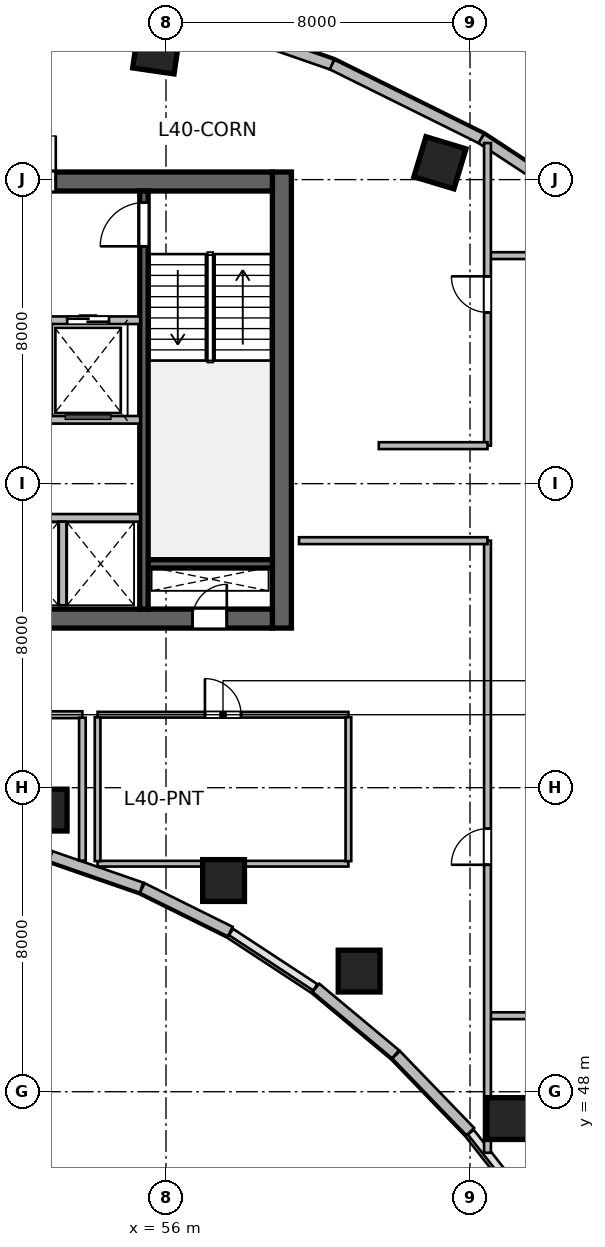
"""IFC4 building model, lengths in metres.
Left out: names, types, materials, properties, quantities, classifications, styles, units other than length and angle.
Written with IfcOpenShell. Run it as: python <this file> out.ifc"""

import sys

from ifc_helpers import new_model, si_unit, direction, frame, frame_2d, origin, origin_2d, place, context, subcontext, project, spatial, rectangle, circle, extrude, source, transform, mapped, element, fill, save


model = new_model("IFC4")
c1 = context("Model", 3, precision=1e-05, world=origin(), true_north=direction((0.0, 1.0)))
c2 = subcontext(c1, "Body", "Model", "MODEL_VIEW")
j1 = project(units=[si_unit("LENGTHUNIT", "METRE"), si_unit("PLANEANGLEUNIT", "RADIAN")], contexts=[c1])
p1 = place(None, origin())
s1 = spatial("IfcSite", under=j1, at=p1, CompositionType="ELEMENT")
p2 = place(p1, origin())
s2 = spatial("IfcBuilding", under=s1, at=p2, CompositionType="ELEMENT")
p3 = place(p2, frame((0.0, 0.0, 166.2)))
s3 = spatial("IfcBuildingStorey", under=s2, at=p3, CompositionType="ELEMENT", Elevation=166.2)
m1 = source(origin(), c2, "Body", "SweptSolid", [
    extrude(rectangle(XDim=12.0, YDim=0.5, at=frame_2d((6.0, 0.0))), origin(), (0.0, 0.0, 1.0), 3.9),
])
p4 = place(p3, frame((59.05, 60.2, 0.0), z_axis=(0.0, 0.0, 1.0), x_axis=(0.0, 1.0, 0.0)))
e1 = element("IfcWall", 1, at=p4, inside=s3, PredefinedType="SHEAR", context=c2, shape_type="MappedRepresentation", body=[
    mapped(m1, transform((0.0, 0.0, 0.0), scale=1.0)),
])
m2 = source(origin(), c2, "Body", "SweptSolid", [
    extrude(rectangle(XDim=21.6, YDim=0.5, at=frame_2d((10.8, 0.0))), origin(), (0.0, 0.0, 1.0), 3.9),
])
p5 = place(p3, frame((37.2, 60.45, 0.0), z_axis=(0.0, 0.0, 1.0), x_axis=(1.0, 0.0, 0.0)))
e2 = element("IfcWall", 2, at=p5, inside=s3, PredefinedType="SHEAR", context=c2, shape_type="MappedRepresentation", body=[
    mapped(m2, transform((0.0, 0.0, 0.0), scale=1.0)),
])
p6 = place(p5, frame((1.1, 0.0, 0.0)))
e3 = element("IfcOpeningElement", 3, at=p6, cuts=e2, PredefinedType="OPENING", context=c2, shape_type="SweptSolid", body=[
    extrude(rectangle(XDim=1.15, YDim=2.15, at=frame_2d((0.575, 1.075))), frame((0.0, 0.26, 0.0), z_axis=(0.0, -1.0, 0.0), x_axis=(1.0, 0.0, 0.0)), (0.0, 0.0, 1.0), 0.52),
])
p7 = place(p5, frame((19.5, 0.0, 0.0)))
e4 = element("IfcOpeningElement", 4, at=p7, cuts=e2, PredefinedType="OPENING", context=c2, shape_type="SweptSolid", body=[
    extrude(rectangle(XDim=0.9, YDim=2.1, at=frame_2d((0.45, 1.05))), frame((0.0, 0.26, 0.0), z_axis=(0.0, -1.0, 0.0), x_axis=(1.0, 0.0, 0.0)), (0.0, 0.0, 1.0), 0.52),
])
p8 = place(p5, frame((12.02, 0.0, 0.0)))
e5 = element("IfcOpeningElement", 5, at=p8, cuts=e2, PredefinedType="OPENING", context=c2, shape_type="SweptSolid", body=[
    extrude(rectangle(XDim=1.6, YDim=2.15, at=frame_2d((0.8, 1.075))), frame((0.0, 0.26, 0.0), z_axis=(0.0, -1.0, 0.0), x_axis=(1.0, 0.0, 0.0)), (0.0, 0.0, 1.0), 0.52),
])
p9 = place(p3, frame((37.2, 71.95, 0.0), z_axis=(0.0, 0.0, 1.0), x_axis=(1.0, 0.0, 0.0)))
e6 = element("IfcWall", 6, at=p9, inside=s3, PredefinedType="SHEAR", context=c2, shape_type="MappedRepresentation", body=[
    mapped(m2, transform((0.0, 0.0, 0.0), scale=1.0)),
])
p10 = place(p9, frame((1.2, 0.0, 0.0)))
e7 = element("IfcOpeningElement", 7, at=p10, cuts=e6, PredefinedType="OPENING", context=c2, shape_type="SweptSolid", body=[
    extrude(rectangle(XDim=0.9, YDim=2.1, at=frame_2d((0.45, 1.05))), frame((0.0, 0.26, 0.0), z_axis=(0.0, -1.0, 0.0), x_axis=(1.0, 0.0, 0.0)), (0.0, 0.0, 1.0), 0.52),
])
p11 = place(p9, frame((14.7, 0.0, 0.0)))
e8 = element("IfcOpeningElement", 8, at=p11, cuts=e6, PredefinedType="OPENING", context=c2, shape_type="SweptSolid", body=[
    extrude(rectangle(XDim=1.2, YDim=2.15, at=frame_2d((0.6, 1.075))), frame((0.0, 0.26, 0.0), z_axis=(0.0, -1.0, 0.0), x_axis=(1.0, 0.0, 0.0)), (0.0, 0.0, 1.0), 0.52),
])
p12 = place(p9, frame((4.15, 0.0, 0.0)))
e9 = element("IfcOpeningElement", 9, at=p12, cuts=e6, PredefinedType="OPENING", context=c2, shape_type="SweptSolid", body=[
    extrude(rectangle(XDim=1.3, YDim=2.15, at=frame_2d((0.65, 1.075))), frame((0.0, 0.26, 0.0), z_axis=(0.0, -1.0, 0.0), x_axis=(1.0, 0.0, 0.0)), (0.0, 0.0, 1.0), 0.52),
])
p13 = place(p9, frame((7.25, 0.0, 0.0)))
e10 = element("IfcOpeningElement", 10, at=p13, cuts=e6, PredefinedType="OPENING", context=c2, shape_type="SweptSolid", body=[
    extrude(rectangle(XDim=0.9, YDim=2.1, at=frame_2d((0.45, 1.05))), frame((0.0, 0.26, 0.0), z_axis=(0.0, -1.0, 0.0), x_axis=(1.0, 0.0, 0.0)), (0.0, 0.0, 1.0), 0.52),
])
p14 = place(p9, frame((10.95, 0.0, 0.0)))
e11 = element("IfcOpeningElement", 11, at=p14, cuts=e6, PredefinedType="OPENING", context=c2, shape_type="SweptSolid", body=[
    extrude(rectangle(XDim=0.9, YDim=2.1, at=frame_2d((0.45, 1.05))), frame((0.0, 0.26, 0.0), z_axis=(0.0, -1.0, 0.0), x_axis=(1.0, 0.0, 0.0)), (0.0, 0.0, 1.0), 0.52),
])
m3 = source(origin(), c2, "Body", "SweptSolid", [
    extrude(rectangle(XDim=3.27, YDim=0.22, at=frame_2d((1.635, 0.0))), origin(), (0.0, 0.0, 1.0), 3.9),
])
p15 = place(p3, frame((55.53, 61.89, 0.0), z_axis=(0.0, 0.0, 1.0), x_axis=(1.0, 0.0, 0.0)))
e12 = element("IfcWall", 12, at=p15, inside=s3, PredefinedType="SHEAR", context=c2, shape_type="MappedRepresentation", body=[
    mapped(m3, transform((0.0, 0.0, 0.0), scale=1.0)),
])
m4 = source(origin(), c2, "Body", "SweptSolid", [
    extrude(rectangle(XDim=11.0, YDim=0.22, at=frame_2d((5.5, 0.0))), origin(), (0.0, 0.0, 1.0), 3.9),
])
p16 = place(p3, frame((55.42, 60.7, 0.0), z_axis=(0.0, 0.0, 1.0), x_axis=(0.0, 1.0, 0.0)))
e13 = element("IfcWall", 13, at=p16, inside=s3, PredefinedType="SHEAR", context=c2, shape_type="MappedRepresentation", body=[
    mapped(m4, transform((0.0, 0.0, 0.0), scale=1.0)),
])
p17 = place(p16, frame((9.545, 0.0, 0.0)))
e14 = element("IfcOpeningElement", 14, at=p17, cuts=e13, PredefinedType="OPENING", context=c2, shape_type="SweptSolid", body=[
    extrude(rectangle(XDim=1.15, YDim=2.15, at=frame_2d((0.575, 1.075))), frame((0.0, 0.12, 0.0), z_axis=(0.0, -1.0, 0.0), x_axis=(1.0, 0.0, 0.0)), (0.0, 0.0, 1.0), 0.24),
])
m5 = source(origin(), c2, "Body", "SweptSolid", [
    extrude(circle(Radius=0.55, at=origin_2d()), origin(), (0.0, 0.0, 1.0), 3.9),
])
p18 = place(p3, frame((52.846, 55.411, 0.0), z_axis=(0.0, 0.0, 1.0), x_axis=(0.143492621991, 0.98965138682, 0.0)))
e15 = element("IfcColumn", 15, at=p18, inside=s3, PredefinedType="COLUMN", context=c2, shape_type="MappedRepresentation", body=[
    mapped(m5, transform((0.0, 0.0, 0.0), scale=1.0)),
])
m6 = source(origin(), c2, "Body", "SweptSolid", [
    extrude(rectangle(XDim=1.1, YDim=1.1, at=origin_2d()), origin(), (0.0, 0.0, 1.0), 3.9),
])
p19 = place(p3, frame((55.747, 75.404, 0.0), z_axis=(0.0, 0.0, 1.0), x_axis=(0.143492621991, 0.98965138682, 0.0)))
e16 = element("IfcColumn", 16, at=p19, inside=s3, PredefinedType="COLUMN", context=c2, shape_type="MappedRepresentation", body=[
    mapped(m6, transform((0.0, 0.0, 0.0), scale=1.0)),
])
p20 = place(p3, frame((57.515, 53.558, 0.0), z_axis=(0.0, 0.0, 1.0), x_axis=(0.288697611798, 0.957420330337, 0.0)))
e17 = element("IfcColumn", 17, at=p20, inside=s3, PredefinedType="COLUMN", context=c2, shape_type="MappedRepresentation", body=[
    mapped(m5, transform((0.0, 0.0, 0.0), scale=1.0)),
])
p21 = place(p3, frame((63.209, 72.442, 0.0), z_axis=(0.0, 0.0, 1.0), x_axis=(0.288697611798, 0.957420330337, 0.0)))
e18 = element("IfcColumn", 18, at=p21, inside=s3, PredefinedType="COLUMN", context=c2, shape_type="MappedRepresentation", body=[
    mapped(m6, transform((0.0, 0.0, 0.0), scale=1.0)),
])
for number, where, z_axis, x_axis in (
    (19, (61.082, 51.175, 0.0), (0.0, 0.0, 1.0), (0.409, 0.912, 0.0)),
    (20, (64.996, 47.294, 0.0), (0.0, 0.0, 1.0), (0.558, 0.83, 0.0)),
):
    element("IfcColumn", number, at=place(p3, frame(where, z_axis=z_axis, x_axis=x_axis)), inside=s3, PredefinedType="COLUMN", context=c2, shape_type="MappedRepresentation", body=[
        mapped(m5, transform((0.0, 0.0, 0.0), scale=1.0)),
    ])
m7 = source(origin(), c2, "Body", "SweptSolid", [
    extrude(rectangle(XDim=2.812, YDim=0.28, at=frame_2d((1.406, 0.0))), origin(), (0.0, 0.0, 1.0), 3.65),
])
p22 = place(p3, frame((64.008, 46.95, 0.0), z_axis=(0.0, 0.0, 1.0), x_axis=(-0.694583668785, 0.719411931411, 0.0)))
e21 = element("IfcWall", 21, at=p22, inside=s3, PredefinedType="SOLIDWALL", context=c2, shape_type="MappedRepresentation", body=[
    mapped(m7, transform((0.0, 0.0, 0.0), scale=1.0)),
])
m8 = source(origin(), c2, "Body", "SweptSolid", [
    extrude(rectangle(XDim=2.729, YDim=0.28, at=frame_2d((1.365, 0.0))), origin(), (0.0, 0.0, 1.0), 3.65),
])
p23 = place(p3, frame((62.041, 48.987, 0.0), z_axis=(0.0, 0.0, 1.0), x_axis=(-0.767957284255, 0.640501061326, 0.0)))
e22 = element("IfcWall", 22, at=p23, inside=s3, PredefinedType="SOLIDWALL", context=c2, shape_type="MappedRepresentation", body=[
    mapped(m8, transform((0.0, 0.0, 0.0), scale=1.0)),
])
m9 = source(origin(), c2, "Body", "SweptSolid", [
    extrude(rectangle(XDim=2.584, YDim=0.28, at=frame_2d((1.292, 0.0))), origin(), (0.0, 0.0, 1.0), 3.65),
])
p24 = place(p3, frame((57.692, 52.213, 0.0), z_axis=(0.0, 0.0, 1.0), x_axis=(-0.895989792847, 0.44407464588, 0.0)))
e23 = element("IfcWall", 23, at=p24, inside=s3, PredefinedType="SOLIDWALL", context=c2, shape_type="MappedRepresentation", body=[
    mapped(m9, transform((0.0, 0.0, 0.0), scale=1.0)),
])
m10 = source(origin(), c2, "Body", "SweptSolid", [
    extrude(rectangle(XDim=2.53, YDim=0.28, at=frame_2d((1.265, 0.0))), origin(), (0.0, 0.0, 1.0), 3.65),
])
p25 = place(p3, frame((55.355, 53.37, 0.0), z_axis=(0.0, 0.0, 1.0), x_axis=(-0.944872429646, 0.327438683872, 0.0)))
e24 = element("IfcWall", 24, at=p25, inside=s3, PredefinedType="SOLIDWALL", context=c2, shape_type="MappedRepresentation", body=[
    mapped(m10, transform((0.0, 0.0, 0.0), scale=1.0)),
])
m11 = source(origin(), c2, "Body", "SweptSolid", [
    extrude(rectangle(XDim=4.29, YDim=0.28, at=frame_2d((2.145, 0.0))), origin(), (0.0, 0.0, 1.0), 3.65),
])
p26 = place(p3, frame((56.317, 76.431, 0.0), z_axis=(0.0, 0.0, 1.0), x_axis=(0.944883859218, -0.3274057003, 0.0)))
e25 = element("IfcWall", 25, at=p26, inside=s3, PredefinedType="SOLIDWALL", context=c2, shape_type="MappedRepresentation", body=[
    mapped(m11, transform((0.0, 0.0, 0.0), scale=1.0)),
])
m12 = source(origin(), c2, "Body", "SweptSolid", [
    extrude(rectangle(XDim=4.384, YDim=0.28, at=frame_2d((2.192, 0.0))), origin(), (0.0, 0.0, 1.0), 3.65),
])
p27 = place(p3, frame((60.37, 75.027, 0.0), z_axis=(0.0, 0.0, 1.0), x_axis=(0.895969968053, -0.444114643248, 0.0)))
e26 = element("IfcWall", 26, at=p27, inside=s3, PredefinedType="SOLIDWALL", context=c2, shape_type="MappedRepresentation", body=[
    mapped(m12, transform((0.0, 0.0, 0.0), scale=1.0)),
])
m13 = source(origin(), c2, "Body", "SweptSolid", [
    extrude(rectangle(XDim=4.501, YDim=0.28, at=frame_2d((2.25, 0.0))), origin(), (0.0, 0.0, 1.0), 3.65),
])
p28 = place(p3, frame((64.298, 73.08, 0.0), z_axis=(0.0, 0.0, 1.0), x_axis=(0.835984920737, -0.548752414391, 0.0)))
e27 = element("IfcWall", 27, at=p28, inside=s3, PredefinedType="SOLIDWALL", context=c2, shape_type="MappedRepresentation", body=[
    mapped(m13, transform((0.0, 0.0, 0.0), scale=1.0)),
])
m14 = source(origin(), c2, "Body", "SweptSolid", [
    extrude(rectangle(XDim=5.62, YDim=0.2, at=frame_2d((2.81, 0.0))), origin(), (0.0, 0.0, 1.0), 3.65),
])
p29 = place(p3, frame((49.7, 68.3, 0.0), z_axis=(0.0, 0.0, 1.0), x_axis=(1.0, 0.0, 0.0)))
e28 = element("IfcWall", 28, at=p29, inside=s3, PredefinedType="SOLIDWALL", context=c2, shape_type="MappedRepresentation", body=[
    mapped(m14, transform((0.0, 0.0, 0.0), scale=1.0)),
])
p30 = place(p29, frame((1.6, 0.0, 0.0)))
e29 = element("IfcOpeningElement", 29, at=p30, cuts=e28, PredefinedType="OPENING", context=c2, shape_type="SweptSolid", body=[
    extrude(rectangle(XDim=1.1, YDim=2.15, at=frame_2d((0.55, 1.075))), frame((0.0, 0.11, 0.0), z_axis=(0.0, -1.0, 0.0), x_axis=(1.0, 0.0, 0.0)), (0.0, 0.0, 1.0), 0.22),
])
p31 = place(p29, frame((3.7, 0.0, 0.0)))
e30 = element("IfcOpeningElement", 30, at=p31, cuts=e28, PredefinedType="OPENING", context=c2, shape_type="SweptSolid", body=[
    extrude(rectangle(XDim=1.1, YDim=2.15, at=frame_2d((0.55, 1.075))), frame((0.0, 0.11, 0.0), z_axis=(0.0, -1.0, 0.0), x_axis=(1.0, 0.0, 0.0)), (0.0, 0.0, 1.0), 0.22),
])
p32 = place(p3, frame((49.7, 65.68, 0.0), z_axis=(0.0, 0.0, 1.0), x_axis=(1.0, 0.0, 0.0)))
e31 = element("IfcWall", 31, at=p32, inside=s3, PredefinedType="SOLIDWALL", context=c2, shape_type="MappedRepresentation", body=[
    mapped(m14, transform((0.0, 0.0, 0.0), scale=1.0)),
])
m15 = source(origin(), c2, "Body", "SweptSolid", [
    extrude(rectangle(XDim=4.1, YDim=0.2, at=frame_2d((2.05, 0.0))), origin(), (0.0, 0.0, 1.0), 3.65),
])
p33 = place(p3, frame((51.22, 63.1, 0.0), z_axis=(0.0, 0.0, 1.0), x_axis=(1.0, 0.0, 0.0)))
e32 = element("IfcWall", 32, at=p33, inside=s3, PredefinedType="SOLIDWALL", context=c2, shape_type="MappedRepresentation", body=[
    mapped(m15, transform((0.0, 0.0, 0.0), scale=1.0)),
])
m16 = source(origin(), c2, "Body", "SweptSolid", [
    extrude(rectangle(XDim=2.2, YDim=0.2, at=frame_2d((1.1, 0.0))), origin(), (0.0, 0.0, 1.0), 3.65),
])
p34 = place(p3, frame((53.28, 60.8, 0.0), z_axis=(0.0, 0.0, 1.0), x_axis=(0.0, 1.0, 0.0)))
e33 = element("IfcWall", 33, at=p34, inside=s3, PredefinedType="SOLIDWALL", context=c2, shape_type="MappedRepresentation", body=[
    mapped(m16, transform((0.0, 0.0, 0.0), scale=1.0)),
])
m17 = source(origin(), c2, "Body", "SweptSolid", [
    extrude(rectangle(XDim=3.248, YDim=0.18, at=frame_2d((1.624, 0.0))), origin(), (0.0, 0.0, 1.0), 3.65),
])
p35 = place(p3, frame((50.552, 57.92, 0.0), z_axis=(0.0, 0.0, 1.0), x_axis=(1.0, 0.0, 0.0)))
e34 = element("IfcWall", 34, at=p35, inside=s3, PredefinedType="PLUMBINGWALL", context=c2, shape_type="MappedRepresentation", body=[
    mapped(m17, transform((0.0, 0.0, 0.0), scale=1.0)),
])
p36 = place(p35, frame((1.149, 0.0, 0.0)))
e35 = element("IfcOpeningElement", 35, at=p36, cuts=e34, PredefinedType="OPENING", context=c2, shape_type="SweptSolid", body=[
    extrude(rectangle(XDim=0.95, YDim=2.12, at=frame_2d((0.475, 1.06))), frame((0.0, 0.1, 0.0), z_axis=(0.0, -1.0, 0.0), x_axis=(1.0, 0.0, 0.0)), (0.0, 0.0, 1.0), 0.2),
])
m18 = source(origin(), c2, "Body", "SweptSolid", [
    extrude(rectangle(XDim=3.763, YDim=0.175, at=frame_2d((1.881, 0.0))), origin(), (0.0, 0.0, 1.0), 3.65),
])
p37 = place(p3, frame((53.8, 54.079, 0.0), z_axis=(0.0, 0.0, 1.0), x_axis=(0.0, 1.0, 0.0)))
e36 = element("IfcWall", 36, at=p37, inside=s3, PredefinedType="PARTITIONING", context=c2, shape_type="MappedRepresentation", body=[
    mapped(m18, transform((0.0, 0.0, 0.0), scale=1.0)),
])
m19 = source(origin(), c2, "Body", "SweptSolid", [
    extrude(rectangle(XDim=6.6, YDim=0.15, at=frame_2d((3.3, 0.0))), origin(), (0.0, 0.0, 1.0), 3.095),
])
p38 = place(p3, frame((54.2, 54.0, 0.0), z_axis=(0.0, 0.0, 1.0), x_axis=(1.0, 0.0, 0.0)))
e37 = element("IfcWall", 37, at=p38, inside=s3, PredefinedType="PARTITIONING", context=c2, shape_type="MappedRepresentation", body=[
    mapped(m19, transform((0.0, 0.0, 0.0), scale=1.0)),
])
m20 = source(origin(), c2, "Body", "SweptSolid", [
    extrude(rectangle(XDim=6.6, YDim=0.15, at=frame_2d((3.3, 0.0))), origin(), (0.0, 0.0, 1.0), 3.65),
])
p39 = place(p3, frame((54.2, 57.92, 0.0), z_axis=(0.0, 0.0, 1.0), x_axis=(1.0, 0.0, 0.0)))
e38 = element("IfcWall", 38, at=p39, inside=s3, PredefinedType="PARTITIONING", context=c2, shape_type="MappedRepresentation", body=[
    mapped(m20, transform((0.0, 0.0, 0.0), scale=1.0)),
])
p40 = place(p39, frame((2.825, 0.0, 0.0)))
e39 = element("IfcOpeningElement", 39, at=p40, cuts=e38, PredefinedType="OPENING", context=c2, shape_type="SweptSolid", body=[
    extrude(rectangle(XDim=0.95, YDim=2.1, at=frame_2d((0.475, 1.05))), frame((0.0, 0.085, 0.0), z_axis=(0.0, -1.0, 0.0), x_axis=(1.0, 0.0, 0.0)), (0.0, 0.0, 1.0), 0.17),
])
m21 = source(origin(), c2, "Body", "SweptSolid", [
    extrude(rectangle(XDim=3.785, YDim=0.15, at=frame_2d((1.893, 0.0))), origin(), (0.0, 0.0, 1.0), 3.65),
])
for number, where, z_axis, x_axis in (
    (40, (54.2, 54.067, 0.0), (0.0, 0.0, 1.0), (0.0, 1.0, 0.0)),
    (41, (60.8, 54.067, 0.0), (0.0, 0.0, 1.0), (0.0, 1.0, 0.0)),
):
    element("IfcWall", number, at=place(p3, frame(where, z_axis=z_axis, x_axis=x_axis)), inside=s3, PredefinedType="PARTITIONING", context=c2, shape_type="MappedRepresentation", body=[
        mapped(m21, transform((0.0, 0.0, 0.0), scale=1.0)),
    ])
m22 = source(origin(), c2, "Body", "SweptSolid", [
    extrude(rectangle(XDim=2.5, YDim=0.18, at=frame_2d((1.25, 0.0))), origin(), (0.0, 0.0, 1.0), 3.65),
])
p41 = place(p3, frame((64.5, 50.0, 0.0), z_axis=(0.0, 0.0, 1.0), x_axis=(1.0, 0.0, 0.0)))
e42 = element("IfcWall", 42, at=p41, inside=s3, PredefinedType="PLUMBINGWALL", context=c2, shape_type="MappedRepresentation", body=[
    mapped(m22, transform((0.0, 0.0, 0.0), scale=1.0)),
])
m23 = source(origin(), c2, "Body", "SweptSolid", [
    extrude(rectangle(XDim=2.5, YDim=0.18, at=frame_2d((1.25, 0.0))), origin(), (0.0, 0.0, 1.0), 3.022),
])
p42 = place(p3, frame((64.5, 70.0, 0.0), z_axis=(0.0, 0.0, 1.0), x_axis=(1.0, 0.0, 0.0)))
e43 = element("IfcWall", 43, at=p42, inside=s3, PredefinedType="PLUMBINGWALL", context=c2, shape_type="MappedRepresentation", body=[
    mapped(m23, transform((0.0, 0.0, 0.0), scale=1.0)),
])
m24 = source(origin(), c2, "Body", "SweptSolid", [
    extrude(rectangle(XDim=16.106, YDim=0.18, at=frame_2d((8.053, 0.0))), origin(), (0.0, 0.0, 1.0), 2.942),
])
p43 = place(p3, frame((64.46, 46.394, 0.0), z_axis=(0.0, 0.0, 1.0), x_axis=(0.0, 1.0, 0.0)))
e44 = element("IfcWall", 44, at=p43, inside=s3, PredefinedType="PLUMBINGWALL", context=c2, shape_type="MappedRepresentation", body=[
    mapped(m24, transform((0.0, 0.0, 0.0), scale=1.0)),
])
p44 = place(p43, frame((7.578, 0.0, 0.0)))
e45 = element("IfcOpeningElement", 45, at=p44, cuts=e44, PredefinedType="OPENING", context=c2, shape_type="SweptSolid", body=[
    extrude(rectangle(XDim=0.95, YDim=2.1, at=frame_2d((0.475, 1.05))), frame((0.0, 0.1, 0.0), z_axis=(0.0, -1.0, 0.0), x_axis=(1.0, 0.0, 0.0)), (0.0, 0.0, 1.0), 0.2),
])
m25 = source(origin(), c2, "Body", "SweptSolid", [
    extrude(rectangle(XDim=4.96, YDim=0.18, at=frame_2d((2.48, 0.0))), origin(), (0.0, 0.0, 1.0), 3.65),
])
p45 = place(p3, frame((59.5, 62.5, 0.0), z_axis=(0.0, 0.0, 1.0), x_axis=(1.0, 0.0, 0.0)))
e46 = element("IfcWall", 46, at=p45, inside=s3, PredefinedType="PLUMBINGWALL", context=c2, shape_type="MappedRepresentation", body=[
    mapped(m25, transform((0.0, 0.0, 0.0), scale=1.0)),
])
m26 = source(origin(), c2, "Body", "SweptSolid", [
    extrude(rectangle(XDim=7.962, YDim=0.18, at=frame_2d((3.981, 0.0))), origin(), (0.0, 0.0, 1.0), 3.65),
])
p46 = place(p3, frame((64.46, 65.0, 0.0), z_axis=(0.0, 0.0, 1.0), x_axis=(0.0, 1.0, 0.0)))
e47 = element("IfcWall", 47, at=p46, inside=s3, PredefinedType="PLUMBINGWALL", context=c2, shape_type="MappedRepresentation", body=[
    mapped(m26, transform((0.0, 0.0, 0.0), scale=1.0)),
])
p47 = place(p46, frame((3.506, 0.0, 0.0)))
e48 = element("IfcOpeningElement", 48, at=p47, cuts=e47, PredefinedType="OPENING", context=c2, shape_type="SweptSolid", body=[
    extrude(rectangle(XDim=0.95, YDim=2.1, at=frame_2d((0.475, 1.05))), frame((0.0, 0.1, 0.0), z_axis=(0.0, -1.0, 0.0), x_axis=(1.0, 0.0, 0.0)), (0.0, 0.0, 1.0), 0.2),
])
m27 = source(origin(), c2, "Body", "SweptSolid", [
    extrude(rectangle(XDim=2.86, YDim=0.18, at=frame_2d((1.43, 0.0))), origin(), (0.0, 0.0, 1.0), 3.65),
])
p48 = place(p3, frame((61.6, 65.0, 0.0), z_axis=(0.0, 0.0, 1.0), x_axis=(1.0, 0.0, 0.0)))
e49 = element("IfcWall", 49, at=p48, inside=s3, PredefinedType="PLUMBINGWALL", context=c2, shape_type="MappedRepresentation", body=[
    mapped(m27, transform((0.0, 0.0, 0.0), scale=1.0)),
])
m28 = source(origin(), c2, "Body", "SweptSolid", [
    extrude(rectangle(XDim=0.9, YDim=2.1, at=frame_2d((0.45, 1.05))), frame((0.0, 0.025, 0.0), z_axis=(0.0, -1.0, 0.0), x_axis=(1.0, 0.0, 0.0)), (0.0, 0.0, 1.0), 0.05),
])
p49 = place(p7, origin())
e50 = element("IfcDoor", 50, at=p49, inside=s3, OperationType="SINGLE_SWING_RIGHT", PredefinedType="DOOR", context=c2, shape_type="MappedRepresentation", body=[
    mapped(m28, transform((0.0, 0.0, 0.0), scale=1.0)),
])
fill(e4, e50)
m29 = source(origin(), c2, "Body", "SweptSolid", [
    extrude(rectangle(XDim=1.15, YDim=2.15, at=frame_2d((0.575, 1.075))), frame((0.0, 0.025, 0.0), z_axis=(0.0, -1.0, 0.0), x_axis=(1.0, 0.0, 0.0)), (0.0, 0.0, 1.0), 0.05),
])
p50 = place(p17, origin())
e51 = element("IfcDoor", 51, at=p50, inside=s3, OperationType="SINGLE_SWING_LEFT", PredefinedType="DOOR", context=c2, shape_type="MappedRepresentation", body=[
    mapped(m29, transform((0.0, 0.0, 0.0), scale=1.0)),
])
fill(e14, e51)
m30 = source(origin(), c2, "Body", "SweptSolid", [
    extrude(rectangle(XDim=1.2, YDim=2.15, at=frame_2d((0.6, 1.075))), frame((0.0, 0.025, 0.0), z_axis=(0.0, -1.0, 0.0), x_axis=(1.0, 0.0, 0.0)), (0.0, 0.0, 1.0), 0.05),
])
p51 = place(p11, origin())
e52 = element("IfcDoor", 52, at=p51, inside=s3, OperationType="SINGLE_SWING_RIGHT", PredefinedType="DOOR", context=c2, shape_type="MappedRepresentation", body=[
    mapped(m30, transform((0.0, 0.0, 0.0), scale=1.0)),
])
fill(e8, e52)
m31 = source(origin(), c2, "Body", "SweptSolid", [
    extrude(rectangle(XDim=1.1, YDim=2.15, at=frame_2d((0.55, 1.075))), frame((0.0, 0.025, 0.0), z_axis=(0.0, -1.0, 0.0), x_axis=(1.0, 0.0, 0.0)), (0.0, 0.0, 1.0), 0.05),
])
p52 = place(p31, origin())
e53 = element("IfcDoor", 53, at=p52, inside=s3, OperationType="DOUBLE_DOOR_SLIDING", PredefinedType="DOOR", context=c2, shape_type="MappedRepresentation", body=[
    mapped(m31, transform((0.0, 0.0, 0.0), scale=1.0)),
])
fill(e30, e53)
m32 = source(origin(), c2, "Body", "SweptSolid", [
    extrude(rectangle(XDim=0.95, YDim=2.1, at=frame_2d((0.475, 1.05))), frame((0.0, 0.025, 0.0), z_axis=(0.0, -1.0, 0.0), x_axis=(1.0, 0.0, 0.0)), (0.0, 0.0, 1.0), 0.05),
])
p53 = place(p40, origin())
e54 = element("IfcDoor", 54, at=p53, inside=s3, OperationType="SINGLE_SWING_LEFT", PredefinedType="DOOR", context=c2, shape_type="MappedRepresentation", body=[
    mapped(m32, transform((0.0, 0.0, 0.0), scale=1.0)),
])
fill(e39, e54)
p54 = place(p44, origin())
e55 = element("IfcDoor", 55, at=p54, inside=s3, OperationType="SINGLE_SWING_LEFT", PredefinedType="DOOR", context=c2, shape_type="MappedRepresentation", body=[
    mapped(m32, transform((0.0, 0.0, 0.0), scale=1.0)),
])
fill(e45, e55)
p55 = place(p47, origin())
e56 = element("IfcDoor", 56, at=p55, inside=s3, OperationType="SINGLE_SWING_RIGHT", PredefinedType="DOOR", context=c2, shape_type="MappedRepresentation", body=[
    mapped(m32, transform((0.0, 0.0, 0.0), scale=1.0)),
])
fill(e48, e56)
save(model, sys.argv[1])
